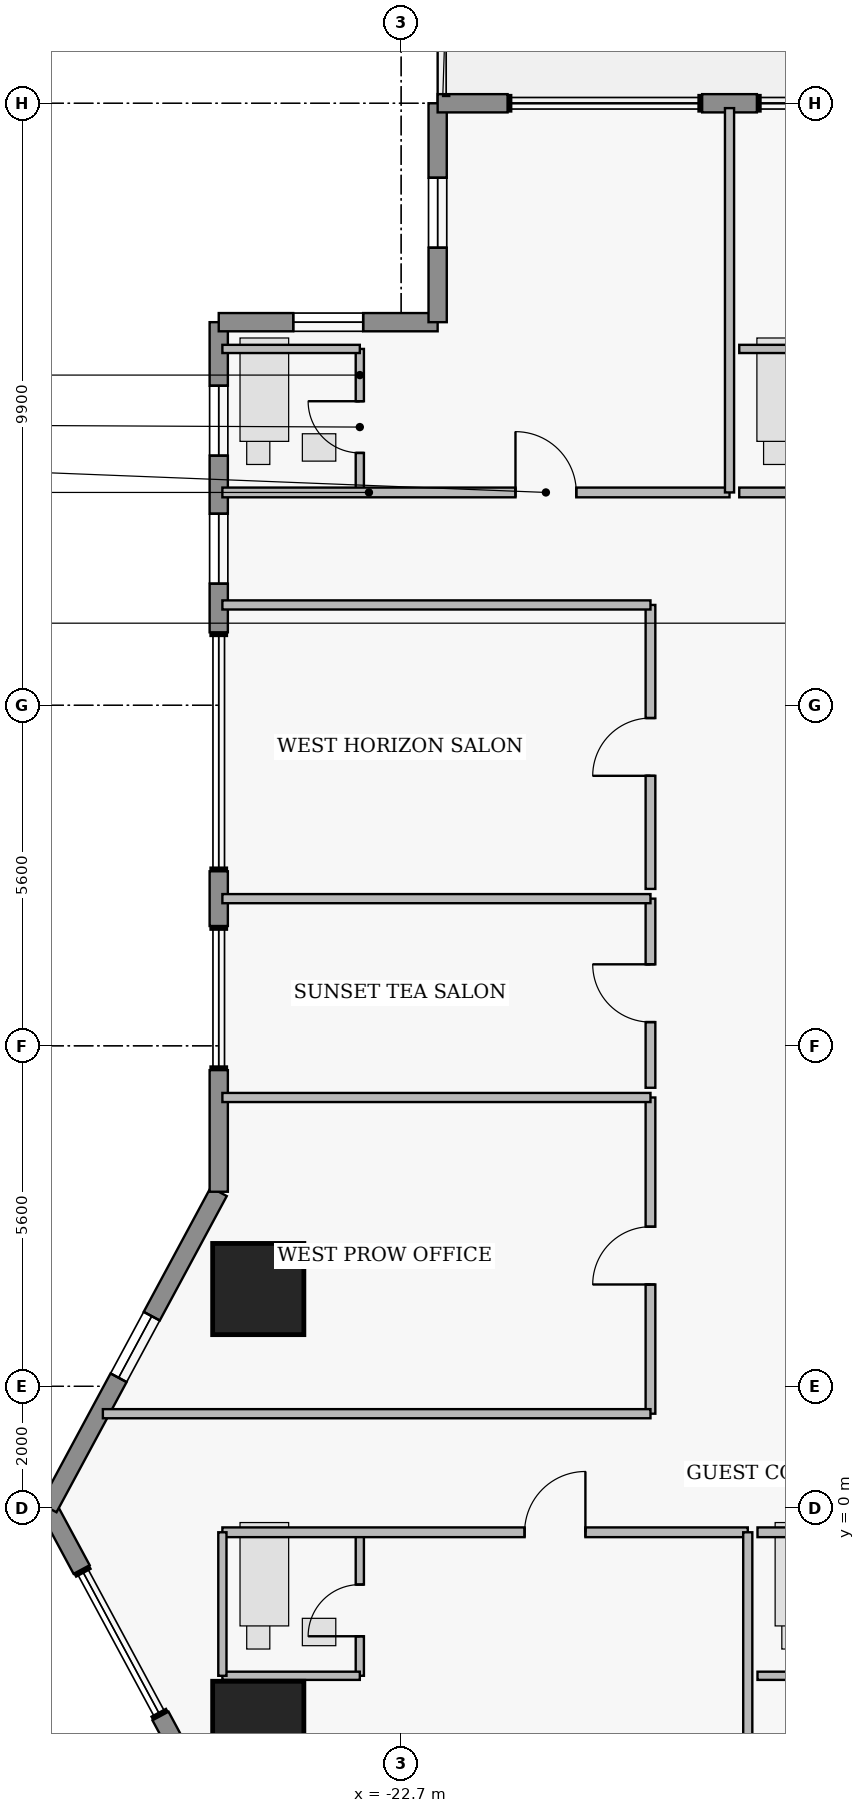
"""IFC4 building model, lengths in metres.
Left out: names, types, materials, properties, quantities, classifications, styles, units other than length and angle.
Written with IfcOpenShell. Run it as: python <this file> out.ifc"""

import sys

from ifc_helpers import new_model, si_unit, direction, frame, frame_2d, origin, origin_2d, place, context, subcontext, project, spatial, rectangle, extrude, element, fill, save


model = new_model("IFC4")
c1 = context("Model", 3, precision=1e-05, world=origin(), true_north=direction((0.0, 1.0)))
c2 = subcontext(c1, "Body", "Model", "MODEL_VIEW")
j1 = project(units=[si_unit("LENGTHUNIT", "METRE"), si_unit("PLANEANGLEUNIT", "RADIAN")], contexts=[c1])
p1 = place(None, origin())
s1 = spatial("IfcSite", under=j1, at=p1, CompositionType="ELEMENT")
p2 = place(p1, origin())
s2 = spatial("IfcBuilding", under=s1, at=p2, CompositionType="ELEMENT")
p3 = place(p2, frame((0.0, 0.0, 38.55)))
s3 = spatial("IfcBuildingStorey", under=s2, at=p3, CompositionType="ELEMENT", Elevation=38.55)
for number, where, z_axis, x_axis in (
    (1, (-25.05, -3.6, 0.0), (0.0, 0.0, 1.0), (1.0, 0.0, 0.0)),
    (2, (-25.05, 3.6, 0.0), (0.0, 0.0, 1.0), (1.0, 0.0, 0.0)),
):
    element("IfcColumn", number, at=place(p3, frame(where, z_axis=z_axis, x_axis=x_axis)), inside=s3, PredefinedType="COLUMN", context=c2, shape_type="SweptSolid", body=[
        extrude(rectangle(XDim=1.5, YDim=1.5, at=origin_2d()), origin(), (0.0, 0.0, 1.0), 3.65),
    ])
p4 = place(p3, frame((-25.7, -5.2, 0.0), z_axis=(0.0, 0.0, 1.0), x_axis=(-0.474121438562, 0.88045946045, 0.0)))
e3 = element("IfcWall", 3, at=p4, inside=s3, PredefinedType="STANDARD", context=c2, shape_type="SweptSolid", body=[
    extrude(rectangle(XDim=2.021, YDim=0.3, at=frame_2d((1.01, 0.0))), origin(), (0.0, 0.0, 1.0), 3.43),
])
p5 = place(p3, frame((-27.955, -1.012, 0.0), z_axis=(0.0, 0.0, 1.0), x_axis=(-0.474099823035, 0.880471099922, 0.0)))
e4 = element("IfcWall", 4, at=p5, inside=s3, PredefinedType="STANDARD", context=c2, shape_type="SweptSolid", body=[
    extrude(rectangle(XDim=1.15, YDim=0.3, at=frame_2d((0.575, 0.0))), origin(), (0.0, 0.0, 1.0), 3.43),
])
p6 = place(p3, frame((-28.5, 0.0, 0.0), z_axis=(0.0, 0.0, 1.0), x_axis=(0.474109683532, 0.880465790352, 0.0)))
e5 = element("IfcWall", 5, at=p6, inside=s3, PredefinedType="STANDARD", context=c2, shape_type="SweptSolid", body=[
    extrude(rectangle(XDim=5.906, YDim=0.3, at=frame_2d((2.953, 0.0))), origin(), (0.0, 0.0, 1.0), 3.43),
])
p7 = place(p6, frame((2.432, 0.0, 0.95)))
e6 = element("IfcOpeningElement", 6, at=p7, cuts=e5, PredefinedType="OPENING", context=c2, shape_type="SweptSolid", body=[
    extrude(rectangle(XDim=1.15, YDim=1.55, at=frame_2d((0.575, 0.775))), frame((0.0, 0.16, 0.0), z_axis=(0.0, -1.0, 0.0), x_axis=(1.0, 0.0, 0.0)), (0.0, 0.0, 1.0), 0.32),
])
p8 = place(p3, frame((-25.7, 5.2, 0.0), z_axis=(0.0, 0.0, 1.0), x_axis=(0.0, 1.0, 0.0)))
e7 = element("IfcWall", 7, at=p8, inside=s3, PredefinedType="STANDARD", context=c2, shape_type="SweptSolid", body=[
    extrude(rectangle(XDim=2.0, YDim=0.3, at=frame_2d((1.0, 0.0))), origin(), (0.0, 0.0, 1.0), 3.43),
])
p9 = place(p3, frame((-25.7, 9.57, 0.0), z_axis=(0.0, 0.0, 1.0), x_axis=(0.0, 1.0, 0.0)))
e8 = element("IfcWall", 8, at=p9, inside=s3, PredefinedType="STANDARD", context=c2, shape_type="SweptSolid", body=[
    extrude(rectangle(XDim=0.9, YDim=0.3, at=frame_2d((0.45, 0.0))), origin(), (0.0, 0.0, 1.0), 3.43),
])
p10 = place(p3, frame((-25.7, 14.4, 0.0), z_axis=(0.0, 0.0, 1.0), x_axis=(0.0, 1.0, 0.0)))
e9 = element("IfcWall", 9, at=p10, inside=s3, PredefinedType="STANDARD", context=c2, shape_type="SweptSolid", body=[
    extrude(rectangle(XDim=5.1, YDim=0.3, at=frame_2d((2.55, 0.0))), origin(), (0.0, 0.0, 1.0), 3.43),
])
p11 = place(p10, frame((0.8, 0.0, 0.95)))
e10 = element("IfcOpeningElement", 10, at=p11, cuts=e9, PredefinedType="OPENING", context=c2, shape_type="SweptSolid", body=[
    extrude(rectangle(XDim=1.15, YDim=1.55, at=frame_2d((0.575, 0.775))), frame((0.0, 0.16, 0.0), z_axis=(0.0, -1.0, 0.0), x_axis=(1.0, 0.0, 0.0)), (0.0, 0.0, 1.0), 0.32),
])
p12 = place(p10, frame((2.905, 0.0, 0.95)))
e11 = element("IfcOpeningElement", 11, at=p12, cuts=e9, PredefinedType="OPENING", context=c2, shape_type="SweptSolid", body=[
    extrude(rectangle(XDim=1.15, YDim=1.55, at=frame_2d((0.575, 0.775))), frame((0.0, 0.16, 0.0), z_axis=(0.0, -1.0, 0.0), x_axis=(1.0, 0.0, 0.0)), (0.0, 0.0, 1.0), 0.32),
])
p13 = place(p3, frame((-25.7, 19.5, 0.0), z_axis=(0.0, 0.0, 1.0), x_axis=(1.0, 0.0, 0.0)))
e12 = element("IfcWall", 12, at=p13, inside=s3, PredefinedType="STANDARD", context=c2, shape_type="SweptSolid", body=[
    extrude(rectangle(XDim=3.6, YDim=0.3, at=frame_2d((1.8, 0.0))), origin(), (0.0, 0.0, 1.0), 3.43),
])
p14 = place(p13, frame((1.225, 0.0, 1.25)))
e13 = element("IfcOpeningElement", 13, at=p14, cuts=e12, PredefinedType="OPENING", context=c2, shape_type="SweptSolid", body=[
    extrude(rectangle(XDim=1.15, YDim=1.55, at=frame_2d((0.575, 0.775))), frame((0.0, 0.16, 0.0), z_axis=(0.0, -1.0, 0.0), x_axis=(1.0, 0.0, 0.0)), (0.0, 0.0, 1.0), 0.32),
])
p15 = place(p3, frame((-22.1, 19.5, 0.0), z_axis=(0.0, 0.0, 1.0), x_axis=(0.0, 1.0, 0.0)))
e14 = element("IfcWall", 14, at=p15, inside=s3, PredefinedType="STANDARD", context=c2, shape_type="SweptSolid", body=[
    extrude(rectangle(XDim=3.6, YDim=0.3, at=frame_2d((1.8, 0.0))), origin(), (0.0, 0.0, 1.0), 3.43),
])
p16 = place(p15, frame((1.225, 0.0, 1.25)))
e15 = element("IfcOpeningElement", 15, at=p16, cuts=e14, PredefinedType="OPENING", context=c2, shape_type="SweptSolid", body=[
    extrude(rectangle(XDim=1.15, YDim=1.55, at=frame_2d((0.575, 0.775))), frame((0.0, 0.16, 0.0), z_axis=(0.0, -1.0, 0.0), x_axis=(1.0, 0.0, 0.0)), (0.0, 0.0, 1.0), 0.32),
])
p17 = place(p3, frame((-22.1, 23.1, 0.0), z_axis=(0.0, 0.0, 1.0), x_axis=(1.0, 0.0, 0.0)))
e16 = element("IfcWall", 16, at=p17, inside=s3, PredefinedType="STANDARD", context=c2, shape_type="SweptSolid", body=[
    extrude(rectangle(XDim=1.15, YDim=0.3, at=frame_2d((0.575, 0.0))), origin(), (0.0, 0.0, 1.0), 3.43),
])
p18 = place(p3, frame((-17.75, 23.1, 0.0), z_axis=(0.0, 0.0, 1.0), x_axis=(1.0, 0.0, 0.0)))
e17 = element("IfcWall", 17, at=p18, inside=s3, PredefinedType="STANDARD", context=c2, shape_type="SweptSolid", body=[
    extrude(rectangle(XDim=0.9, YDim=0.3, at=frame_2d((0.45, 0.0))), origin(), (0.0, 0.0, 1.0), 3.43),
])
p19 = place(p3, frame((-23.38, 16.7, 0.0), z_axis=(0.0, 0.0, 1.0), x_axis=(0.0, 1.0, 0.0)))
e18 = element("IfcWall", 18, at=p19, inside=s3, PredefinedType="PLUMBINGWALL", context=c2, shape_type="SweptSolid", body=[
    extrude(rectangle(XDim=2.36, YDim=0.135, at=frame_2d((1.18, 0.0))), origin(), (0.0, 0.0, 1.0), 3.43),
])
p20 = place(p19, frame((0.65, 0.0, 0.0)))
e19 = element("IfcOpeningElement", 19, at=p20, cuts=e18, PredefinedType="OPENING", context=c2, shape_type="SweptSolid", body=[
    extrude(rectangle(XDim=0.85, YDim=2.1, at=frame_2d((0.425, 1.05))), frame((0.0, 0.077, 0.0), z_axis=(0.0, -1.0, 0.0), x_axis=(1.0, 0.0, 0.0)), (0.0, 0.0, 1.0), 0.155),
])
p21 = place(p3, frame((-25.64, 16.7, 0.0), z_axis=(0.0, 0.0, 1.0), x_axis=(1.0, 0.0, 0.0)))
e20 = element("IfcWall", 20, at=p21, inside=s3, PredefinedType="PARTITIONING", context=c2, shape_type="SweptSolid", body=[
    extrude(rectangle(XDim=8.34, YDim=0.16, at=frame_2d((4.17, 0.0))), origin(), (0.0, 0.0, 1.0), 3.43),
])
p22 = place(p21, frame((4.82, 0.0, 0.0)))
e21 = element("IfcOpeningElement", 21, at=p22, cuts=e20, PredefinedType="OPENING", context=c2, shape_type="SweptSolid", body=[
    extrude(rectangle(XDim=1.0, YDim=2.15, at=frame_2d((0.5, 1.075))), frame((0.0, 0.09, 0.0), z_axis=(0.0, -1.0, 0.0), x_axis=(1.0, 0.0, 0.0)), (0.0, 0.0, 1.0), 0.18),
])
p23 = place(p3, frame((-17.14, 16.7, 0.0), z_axis=(0.0, 0.0, 1.0), x_axis=(1.0, 0.0, 0.0)))
e22 = element("IfcWall", 22, at=p23, inside=s3, PredefinedType="PARTITIONING", context=c2, shape_type="SweptSolid", body=[
    extrude(rectangle(XDim=8.34, YDim=0.16, at=frame_2d((4.17, 0.0))), origin(), (0.0, 0.0, 1.0), 2.973),
])
p24 = place(p23, frame((4.82, 0.0, 0.0)))
e23 = element("IfcOpeningElement", 23, at=p24, cuts=e22, PredefinedType="OPENING", context=c2, shape_type="SweptSolid", body=[
    extrude(rectangle(XDim=1.0, YDim=2.15, at=frame_2d((0.5, 1.075))), frame((0.0, 0.09, 0.0), z_axis=(0.0, -1.0, 0.0), x_axis=(1.0, 0.0, 0.0)), (0.0, 0.0, 1.0), 0.18),
])
p25 = place(p3, frame((-23.38, -2.76, 0.0), z_axis=(0.0, 0.0, 1.0), x_axis=(0.0, 1.0, 0.0)))
e24 = element("IfcWall", 24, at=p25, inside=s3, PredefinedType="PLUMBINGWALL", context=c2, shape_type="SweptSolid", body=[
    extrude(rectangle(XDim=2.36, YDim=0.135, at=frame_2d((1.18, 0.0))), origin(), (0.0, 0.0, 1.0), 3.43),
])
p26 = place(p25, frame((0.65, 0.0, 0.0)))
e25 = element("IfcOpeningElement", 25, at=p26, cuts=e24, PredefinedType="OPENING", context=c2, shape_type="SweptSolid", body=[
    extrude(rectangle(XDim=0.85, YDim=2.1, at=frame_2d((0.425, 1.05))), frame((0.0, 0.077, 0.0), z_axis=(0.0, -1.0, 0.0), x_axis=(1.0, 0.0, 0.0)), (0.0, 0.0, 1.0), 0.155),
])
p27 = place(p3, frame((-25.64, -0.4, 0.0), z_axis=(0.0, 0.0, 1.0), x_axis=(1.0, 0.0, 0.0)))
e26 = element("IfcWall", 26, at=p27, inside=s3, PredefinedType="PARTITIONING", context=c2, shape_type="SweptSolid", body=[
    extrude(rectangle(XDim=8.64, YDim=0.16, at=frame_2d((4.32, 0.0))), origin(), (0.0, 0.0, 1.0), 3.43),
])
p28 = place(p27, frame((4.97, 0.0, 0.0)))
e27 = element("IfcOpeningElement", 27, at=p28, cuts=e26, PredefinedType="OPENING", context=c2, shape_type="SweptSolid", body=[
    extrude(rectangle(XDim=1.0, YDim=2.15, at=frame_2d((0.5, 1.075))), frame((0.0, 0.09, 0.0), z_axis=(0.0, -1.0, 0.0), x_axis=(1.0, 0.0, 0.0)), (0.0, 0.0, 1.0), 0.18),
])
p29 = place(p3, frame((-16.84, -0.4, 0.0), z_axis=(0.0, 0.0, 1.0), x_axis=(1.0, 0.0, 0.0)))
e28 = element("IfcWall", 28, at=p29, inside=s3, PredefinedType="PARTITIONING", context=c2, shape_type="SweptSolid", body=[
    extrude(rectangle(XDim=8.64, YDim=0.16, at=frame_2d((4.32, 0.0))), origin(), (0.0, 0.0, 1.0), 3.43),
])
p30 = place(p29, frame((4.97, 0.0, 0.0)))
e29 = element("IfcOpeningElement", 29, at=p30, cuts=e28, PredefinedType="OPENING", context=c2, shape_type="SweptSolid", body=[
    extrude(rectangle(XDim=1.0, YDim=2.15, at=frame_2d((0.5, 1.075))), frame((0.0, 0.09, 0.0), z_axis=(0.0, -1.0, 0.0), x_axis=(1.0, 0.0, 0.0)), (0.0, 0.0, 1.0), 0.18),
])
p31 = place(p3, frame((-18.6, 1.55, 0.0), z_axis=(0.0, 0.0, 1.0), x_axis=(0.0, 1.0, 0.0)))
e30 = element("IfcWall", 30, at=p31, inside=s3, PredefinedType="PARTITIONING", context=c2, shape_type="SweptSolid", body=[
    extrude(rectangle(XDim=5.2, YDim=0.16, at=frame_2d((2.6, 0.0))), origin(), (0.0, 0.0, 1.0), 3.43),
])
p32 = place(p31, frame((2.125, 0.0, 0.0)))
e31 = element("IfcOpeningElement", 31, at=p32, cuts=e30, PredefinedType="OPENING", context=c2, shape_type="SweptSolid", body=[
    extrude(rectangle(XDim=0.95, YDim=2.15, at=frame_2d((0.475, 1.075))), frame((0.0, 0.09, 0.0), z_axis=(0.0, -1.0, 0.0), x_axis=(1.0, 0.0, 0.0)), (0.0, 0.0, 1.0), 0.18),
])
p33 = place(p3, frame((-18.6, 6.91, 0.0), z_axis=(0.0, 0.0, 1.0), x_axis=(0.0, 1.0, 0.0)))
e32 = element("IfcWall", 32, at=p33, inside=s3, PredefinedType="PARTITIONING", context=c2, shape_type="SweptSolid", body=[
    extrude(rectangle(XDim=3.11, YDim=0.16, at=frame_2d((1.555, 0.0))), origin(), (0.0, 0.0, 1.0), 3.43),
])
p34 = place(p33, frame((1.08, 0.0, 0.0)))
e33 = element("IfcOpeningElement", 33, at=p34, cuts=e32, PredefinedType="OPENING", context=c2, shape_type="SweptSolid", body=[
    extrude(rectangle(XDim=0.95, YDim=2.15, at=frame_2d((0.475, 1.075))), frame((0.0, 0.09, 0.0), z_axis=(0.0, -1.0, 0.0), x_axis=(1.0, 0.0, 0.0)), (0.0, 0.0, 1.0), 0.18),
])
p35 = place(p3, frame((-18.6, 10.18, 0.0), z_axis=(0.0, 0.0, 1.0), x_axis=(0.0, 1.0, 0.0)))
e34 = element("IfcWall", 34, at=p35, inside=s3, PredefinedType="PARTITIONING", context=c2, shape_type="SweptSolid", body=[
    extrude(rectangle(XDim=4.67, YDim=0.16, at=frame_2d((2.335, 0.0))), origin(), (0.0, 0.0, 1.0), 3.43),
])
p36 = place(p35, frame((1.86, 0.0, 0.0)))
e35 = element("IfcOpeningElement", 35, at=p36, cuts=e34, PredefinedType="OPENING", context=c2, shape_type="SweptSolid", body=[
    extrude(rectangle(XDim=0.95, YDim=2.15, at=frame_2d((0.475, 1.075))), frame((0.0, 0.09, 0.0), z_axis=(0.0, -1.0, 0.0), x_axis=(1.0, 0.0, 0.0)), (0.0, 0.0, 1.0), 0.18),
])
p37 = place(p3, frame((-25.64, 19.06, 0.0), z_axis=(0.0, 0.0, 1.0), x_axis=(1.0, 0.0, 0.0)))
e36 = element("IfcWall", 36, at=p37, inside=s3, PredefinedType="PLUMBINGWALL", context=c2, shape_type="SweptSolid", body=[
    extrude(rectangle(XDim=2.26, YDim=0.135, at=frame_2d((1.13, 0.0))), origin(), (0.0, 0.0, 1.0), 3.43),
])
p38 = place(p3, frame((-17.3, 16.7, 0.0), z_axis=(0.0, 0.0, 1.0), x_axis=(0.0, 1.0, 0.0)))
e37 = element("IfcWall", 37, at=p38, inside=s3, PredefinedType="PARTITIONING", context=c2, shape_type="SweptSolid", body=[
    extrude(rectangle(XDim=6.32, YDim=0.15, at=frame_2d((3.16, 0.0))), origin(), (0.0, 0.0, 1.0), 3.43),
])
for number, where, z_axis, x_axis in (
    (38, (-17.14, 19.06, 0.0), (0.0, 0.0, 1.0), (1.0, 0.0, 0.0)),
    (39, (-25.64, -2.76, 0.0), (0.0, 0.0, 1.0), (1.0, 0.0, 0.0)),
):
    element("IfcWall", number, at=place(p3, frame(where, z_axis=z_axis, x_axis=x_axis)), inside=s3, PredefinedType="PLUMBINGWALL", context=c2, shape_type="SweptSolid", body=[
        extrude(rectangle(XDim=2.26, YDim=0.135, at=frame_2d((1.13, 0.0))), origin(), (0.0, 0.0, 1.0), 3.43),
    ])
p39 = place(p3, frame((-25.64, -2.76, 0.0), z_axis=(0.0, 0.0, 1.0), x_axis=(0.0, 1.0, 0.0)))
e40 = element("IfcWall", 40, at=p39, inside=s3, PredefinedType="PLUMBINGWALL", context=c2, shape_type="SweptSolid", body=[
    extrude(rectangle(XDim=2.36, YDim=0.135, at=frame_2d((1.18, 0.0))), origin(), (0.0, 0.0, 1.0), 3.43),
])
p40 = place(p3, frame((-17.0, -23.02, 0.0), z_axis=(0.0, 0.0, 1.0), x_axis=(0.0, 1.0, 0.0)))
e41 = element("IfcWall", 41, at=p40, inside=s3, PredefinedType="PARTITIONING", context=c2, shape_type="SweptSolid", body=[
    extrude(rectangle(XDim=22.62, YDim=0.15, at=frame_2d((11.31, 0.0))), origin(), (0.0, 0.0, 1.0), 3.43),
])
p41 = place(p3, frame((-16.84, -2.76, 0.0), z_axis=(0.0, 0.0, 1.0), x_axis=(1.0, 0.0, 0.0)))
e42 = element("IfcWall", 42, at=p41, inside=s3, PredefinedType="PLUMBINGWALL", context=c2, shape_type="SweptSolid", body=[
    extrude(rectangle(XDim=2.26, YDim=0.135, at=frame_2d((1.13, 0.0))), origin(), (0.0, 0.0, 1.0), 3.43),
])
p42 = place(p3, frame((-27.605, 1.55, 0.0), z_axis=(0.0, 0.0, 1.0), x_axis=(1.0, 0.0, 0.0)))
e43 = element("IfcWall", 43, at=p42, inside=s3, PredefinedType="PARTITIONING", context=c2, shape_type="SweptSolid", body=[
    extrude(rectangle(XDim=9.005, YDim=0.15, at=frame_2d((4.503, 0.0))), origin(), (0.0, 0.0, 1.0), 3.43),
])
for number, where, z_axis, x_axis in (
    (44, (-25.64, 6.75, 0.0), (0.0, 0.0, 1.0), (1.0, 0.0, 0.0)),
    (45, (-25.64, 10.02, 0.0), (0.0, 0.0, 1.0), (1.0, 0.0, 0.0)),
    (46, (-25.64, 14.85, 0.0), (0.0, 0.0, 1.0), (1.0, 0.0, 0.0)),
):
    element("IfcWall", number, at=place(p3, frame(where, z_axis=z_axis, x_axis=x_axis)), inside=s3, PredefinedType="PARTITIONING", context=c2, shape_type="SweptSolid", body=[
        extrude(rectangle(XDim=7.04, YDim=0.15, at=frame_2d((3.52, 0.0))), origin(), (0.0, 0.0, 1.0), 3.43),
    ])
p43 = place(p7, origin())
e47 = element("IfcWindow", 47, at=p43, inside=s3, PartitioningType="SINGLE_PANEL", PredefinedType="WINDOW", context=c2, shape_type="SweptSolid", body=[
    extrude(rectangle(XDim=1.15, YDim=1.55, at=frame_2d((0.575, 0.775))), frame((0.0, 0.03, 0.0), z_axis=(0.0, -1.0, 0.0), x_axis=(1.0, 0.0, 0.0)), (0.0, 0.0, 1.0), 0.06),
])
fill(e6, e47)
p44 = place(p11, origin())
e48 = element("IfcWindow", 48, at=p44, inside=s3, PartitioningType="SINGLE_PANEL", PredefinedType="WINDOW", context=c2, shape_type="SweptSolid", body=[
    extrude(rectangle(XDim=1.15, YDim=1.55, at=frame_2d((0.575, 0.775))), frame((0.0, 0.03, 0.0), z_axis=(0.0, -1.0, 0.0), x_axis=(1.0, 0.0, 0.0)), (0.0, 0.0, 1.0), 0.06),
])
fill(e10, e48)
p45 = place(p12, origin())
e49 = element("IfcWindow", 49, at=p45, inside=s3, PartitioningType="SINGLE_PANEL", PredefinedType="WINDOW", context=c2, shape_type="SweptSolid", body=[
    extrude(rectangle(XDim=1.15, YDim=1.55, at=frame_2d((0.575, 0.775))), frame((0.0, 0.03, 0.0), z_axis=(0.0, -1.0, 0.0), x_axis=(1.0, 0.0, 0.0)), (0.0, 0.0, 1.0), 0.06),
])
fill(e11, e49)
p46 = place(p14, origin())
e50 = element("IfcWindow", 50, at=p46, inside=s3, PartitioningType="SINGLE_PANEL", PredefinedType="WINDOW", context=c2, shape_type="SweptSolid", body=[
    extrude(rectangle(XDim=1.15, YDim=1.55, at=frame_2d((0.575, 0.775))), frame((0.0, 0.03, 0.0), z_axis=(0.0, -1.0, 0.0), x_axis=(1.0, 0.0, 0.0)), (0.0, 0.0, 1.0), 0.06),
])
fill(e13, e50)
p47 = place(p16, origin())
e51 = element("IfcWindow", 51, at=p47, inside=s3, PartitioningType="SINGLE_PANEL", PredefinedType="WINDOW", context=c2, shape_type="SweptSolid", body=[
    extrude(rectangle(XDim=1.15, YDim=1.55, at=frame_2d((0.575, 0.775))), frame((0.0, 0.03, 0.0), z_axis=(0.0, -1.0, 0.0), x_axis=(1.0, 0.0, 0.0)), (0.0, 0.0, 1.0), 0.06),
])
fill(e15, e51)
p48 = place(p20, origin())
e52 = element("IfcDoor", 52, at=p48, inside=s3, OperationType="SINGLE_SWING_RIGHT", PredefinedType="DOOR", context=c2, shape_type="SweptSolid", body=[
    extrude(rectangle(XDim=0.85, YDim=2.1, at=frame_2d((0.425, 1.05))), frame((0.0, 0.025, 0.0), z_axis=(0.0, -1.0, 0.0), x_axis=(1.0, 0.0, 0.0)), (0.0, 0.0, 1.0), 0.05),
])
fill(e19, e52)
p49 = place(p22, origin())
e53 = element("IfcDoor", 53, at=p49, inside=s3, OperationType="SINGLE_SWING_LEFT", PredefinedType="DOOR", context=c2, shape_type="SweptSolid", body=[
    extrude(rectangle(XDim=1.0, YDim=2.15, at=frame_2d((0.5, 1.075))), frame((0.0, 0.025, 0.0), z_axis=(0.0, -1.0, 0.0), x_axis=(1.0, 0.0, 0.0)), (0.0, 0.0, 1.0), 0.05),
])
fill(e21, e53)
p50 = place(p26, origin())
e54 = element("IfcDoor", 54, at=p50, inside=s3, OperationType="SINGLE_SWING_LEFT", PredefinedType="DOOR", context=c2, shape_type="SweptSolid", body=[
    extrude(rectangle(XDim=0.85, YDim=2.1, at=frame_2d((0.425, 1.05))), frame((0.0, 0.025, 0.0), z_axis=(0.0, -1.0, 0.0), x_axis=(1.0, 0.0, 0.0)), (0.0, 0.0, 1.0), 0.05),
])
fill(e25, e54)
p51 = place(p28, origin())
e55 = element("IfcDoor", 55, at=p51, inside=s3, OperationType="SINGLE_SWING_RIGHT", PredefinedType="DOOR", context=c2, shape_type="SweptSolid", body=[
    extrude(rectangle(XDim=1.0, YDim=2.15, at=frame_2d((0.5, 1.075))), frame((0.0, 0.025, 0.0), z_axis=(0.0, -1.0, 0.0), x_axis=(1.0, 0.0, 0.0)), (0.0, 0.0, 1.0), 0.05),
])
fill(e27, e55)
p52 = place(p32, origin())
e56 = element("IfcDoor", 56, at=p52, inside=s3, OperationType="SINGLE_SWING_LEFT", PredefinedType="DOOR", context=c2, shape_type="SweptSolid", body=[
    extrude(rectangle(XDim=0.95, YDim=2.15, at=frame_2d((0.475, 1.075))), frame((0.0, 0.025, 0.0), z_axis=(0.0, -1.0, 0.0), x_axis=(1.0, 0.0, 0.0)), (0.0, 0.0, 1.0), 0.05),
])
fill(e31, e56)
p53 = place(p34, origin())
e57 = element("IfcDoor", 57, at=p53, inside=s3, OperationType="SINGLE_SWING_RIGHT", PredefinedType="DOOR", context=c2, shape_type="SweptSolid", body=[
    extrude(rectangle(XDim=0.95, YDim=2.15, at=frame_2d((0.475, 1.075))), frame((0.0, 0.025, 0.0), z_axis=(0.0, -1.0, 0.0), x_axis=(1.0, 0.0, 0.0)), (0.0, 0.0, 1.0), 0.05),
])
fill(e33, e57)
p54 = place(p36, origin())
e58 = element("IfcDoor", 58, at=p54, inside=s3, OperationType="SINGLE_SWING_LEFT", PredefinedType="DOOR", context=c2, shape_type="SweptSolid", body=[
    extrude(rectangle(XDim=0.95, YDim=2.15, at=frame_2d((0.475, 1.075))), frame((0.0, 0.025, 0.0), z_axis=(0.0, -1.0, 0.0), x_axis=(1.0, 0.0, 0.0)), (0.0, 0.0, 1.0), 0.05),
])
fill(e35, e58)
save(model, sys.argv[1])
